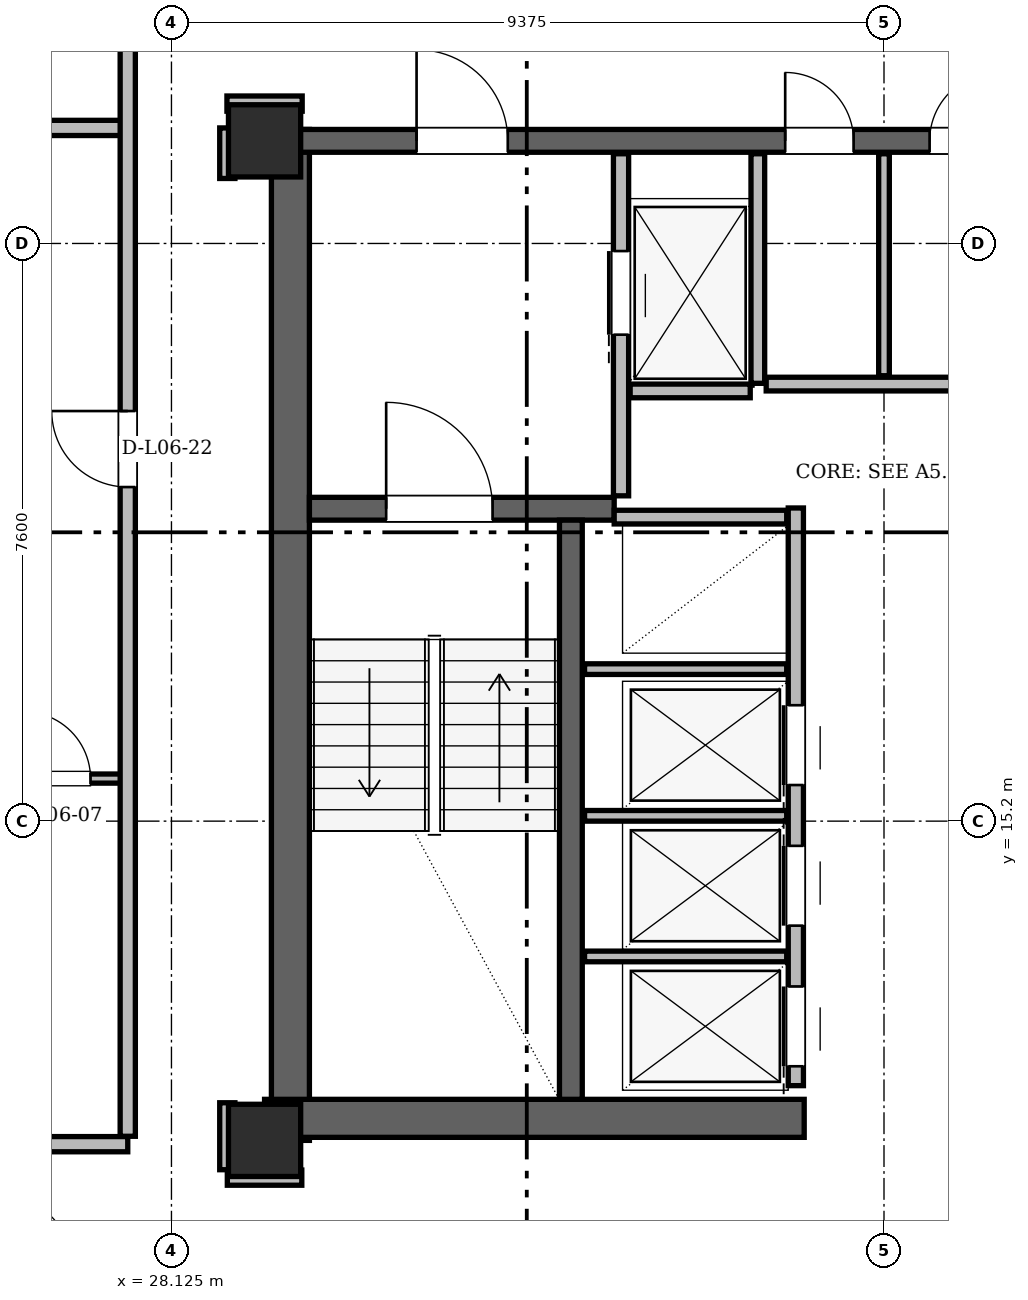
"""IFC4 building model, lengths in metres.
Left out: names, types, materials, properties, quantities, classifications, styles, units other than length and angle.
Written with IfcOpenShell. Run it as: python <this file> out.ifc"""

import sys

from ifc_helpers import new_model, si_unit, direction, frame, frame_2d, origin, origin_2d, place, context, subcontext, project, spatial, rectangle, hollow_rectangle, extrude, element, fill, save


model = new_model("IFC4")
c1 = context("Model", 3, precision=1e-05, world=origin(), true_north=direction((0.0, 1.0)))
c2 = subcontext(c1, "Body", "Model", "MODEL_VIEW")
j1 = project(units=[si_unit("LENGTHUNIT", "METRE"), si_unit("PLANEANGLEUNIT", "RADIAN")], contexts=[c1])
p1 = place(None, origin())
s1 = spatial("IfcSite", under=j1, at=p1, CompositionType="ELEMENT")
p2 = place(p1, origin())
s2 = spatial("IfcBuilding", under=s1, at=p2, CompositionType="ELEMENT")
p3 = place(p2, frame((0.0, 0.0, 27.3)))
s3 = spatial("IfcBuildingStorey", under=s2, at=p3, CompositionType="ELEMENT", Elevation=27.3)
for number, where, z_axis, x_axis in (
    (1, (29.35, 11.0, 0.0), (0.0, 0.0, 1.0), (1.0, 0.0, 0.0)),
    (2, (29.35, 24.15, 0.0), (0.0, 0.0, 1.0), (1.0, 0.0, 0.0)),
):
    element("IfcColumn", number, at=place(p3, frame(where, z_axis=z_axis, x_axis=x_axis)), inside=s3, PredefinedType="COLUMN", context=c2, shape_type="SweptSolid", body=[
        extrude(hollow_rectangle(XDim=0.95, YDim=0.95, WallThickness=0.08, at=origin_2d()), origin(), (0.0, 0.0, 1.0), 3.6),
    ])
p4 = place(p3, frame((29.69, 11.0, 0.0), z_axis=(0.0, 0.0, 1.0), x_axis=(0.0, 1.0, 0.0)))
e3 = element("IfcWall", 3, at=p4, inside=s3, PredefinedType="SHEAR", context=c2, shape_type="SweptSolid", body=[
    extrude(rectangle(XDim=13.3, YDim=0.5, at=frame_2d((6.65, 0.0))), origin(), (0.0, 0.0, 1.0), 3.36),
])
p5 = place(p3, frame((29.35, 11.29, 0.0), z_axis=(0.0, 0.0, 1.0), x_axis=(1.0, 0.0, 0.0)))
e4 = element("IfcWall", 4, at=p5, inside=s3, PredefinedType="SHEAR", context=c2, shape_type="SweptSolid", body=[
    extrude(rectangle(XDim=7.1, YDim=0.5, at=frame_2d((3.55, 0.0))), origin(), (0.0, 0.0, 1.0), 3.36),
])
p6 = place(p3, frame((29.65, 24.15, 0.0), z_axis=(0.0, 0.0, 1.0), x_axis=(1.0, 0.0, 0.0)))
e5 = element("IfcWall", 5, at=p6, inside=s3, PredefinedType="SHEAR", context=c2, shape_type="SweptSolid", body=[
    extrude(rectangle(XDim=15.7, YDim=0.3, at=frame_2d((7.85, 0.0))), origin(), (0.0, 0.0, 1.0), 3.36),
])
p7 = place(p6, frame((1.7, 0.0, 0.0)))
e6 = element("IfcOpeningElement", 6, at=p7, cuts=e5, PredefinedType="OPENING", context=c2, shape_type="SweptSolid", body=[
    extrude(rectangle(XDim=1.2, YDim=2.2, at=frame_2d((0.6, 1.1))), frame((0.0, 0.15, 0.0), z_axis=(0.0, -1.0, 0.0), x_axis=(1.0, 0.0, 0.0)), (0.0, 0.0, 1.0), 0.3),
])
p8 = place(p6, frame((12.8, 0.0, 0.0)))
e7 = element("IfcOpeningElement", 7, at=p8, cuts=e5, PredefinedType="OPENING", context=c2, shape_type="SweptSolid", body=[
    extrude(rectangle(XDim=1.2, YDim=2.2, at=frame_2d((0.6, 1.1))), frame((0.0, 0.15, 0.0), z_axis=(0.0, -1.0, 0.0), x_axis=(1.0, 0.0, 0.0)), (0.0, 0.0, 1.0), 0.3),
])
p9 = place(p6, frame((6.55, 0.0, 0.0)))
e8 = element("IfcOpeningElement", 8, at=p9, cuts=e5, PredefinedType="OPENING", context=c2, shape_type="SweptSolid", body=[
    extrude(rectangle(XDim=0.9, YDim=2.05, at=frame_2d((0.45, 1.025))), frame((0.0, 0.15, 0.0), z_axis=(0.0, -1.0, 0.0), x_axis=(1.0, 0.0, 0.0)), (0.0, 0.0, 1.0), 0.3),
])
p10 = place(p6, frame((8.45, 0.0, 0.0)))
e9 = element("IfcOpeningElement", 9, at=p10, cuts=e5, PredefinedType="OPENING", context=c2, shape_type="SweptSolid", body=[
    extrude(rectangle(XDim=0.9, YDim=2.05, at=frame_2d((0.45, 1.025))), frame((0.0, 0.15, 0.0), z_axis=(0.0, -1.0, 0.0), x_axis=(1.0, 0.0, 0.0)), (0.0, 0.0, 1.0), 0.3),
])
p11 = place(p3, frame((29.94, 19.31, 0.0), z_axis=(0.0, 0.0, 1.0), x_axis=(1.0, 0.0, 0.0)))
e10 = element("IfcWall", 10, at=p11, inside=s3, PredefinedType="SHEAR", context=c2, shape_type="SweptSolid", body=[
    extrude(rectangle(XDim=4.01, YDim=0.3, at=frame_2d((2.005, 0.0))), origin(), (0.0, 0.0, 1.0), 3.36),
])
p12 = place(p11, frame((1.01, 0.0, 0.0)))
e11 = element("IfcOpeningElement", 11, at=p12, cuts=e10, PredefinedType="OPENING", context=c2, shape_type="SweptSolid", body=[
    extrude(rectangle(XDim=1.4, YDim=2.2, at=frame_2d((0.7, 1.1))), frame((0.0, 0.15, 0.0), z_axis=(0.0, -1.0, 0.0), x_axis=(1.0, 0.0, 0.0)), (0.0, 0.0, 1.0), 0.3),
])
p13 = place(p3, frame((33.38, 11.54, 0.0), z_axis=(0.0, 0.0, 1.0), x_axis=(0.0, 1.0, 0.0)))
e12 = element("IfcWall", 12, at=p13, inside=s3, PredefinedType="SHEAR", context=c2, shape_type="SweptSolid", body=[
    extrude(rectangle(XDim=7.62, YDim=0.3, at=frame_2d((3.81, 0.0))), origin(), (0.0, 0.0, 1.0), 3.36),
])
p14 = place(p3, frame((29.452, 43.64, 0.0), z_axis=(0.0, 0.0, 1.0), x_axis=(-0.50000660679, -0.866021589319, 0.0)))
e13 = element("IfcWall", 13, at=p14, inside=s3, PredefinedType="SOLIDWALL", context=c2, shape_type="SweptSolid", body=[
    extrude(rectangle(XDim=32.724, YDim=0.34, at=frame_2d((16.362, 0.0))), origin(), (0.0, 0.0, 1.0), 2.494),
])
p15 = place(p14, frame((2.05, 0.0, 0.0)))
e14 = element("IfcOpeningElement", 14, at=p15, cuts=e13, PredefinedType="OPENING", context=c2, shape_type="SweptSolid", body=[
    extrude(rectangle(XDim=1.6, YDim=2.2, at=frame_2d((0.8, 1.1))), frame((0.0, 0.17, 0.0), z_axis=(0.0, -1.0, 0.0), x_axis=(1.0, 0.0, 0.0)), (0.0, 0.0, 1.0), 0.34),
])
p16 = place(p14, frame((24.19, 0.0, 0.85)))
e15 = element("IfcOpeningElement", 15, at=p16, cuts=e13, PredefinedType="OPENING", context=c2, shape_type="SweptSolid", body=[
    extrude(rectangle(XDim=1.2, YDim=1.48, at=frame_2d((0.6, 0.74))), frame((0.0, 0.17, 0.0), z_axis=(0.0, -1.0, 0.0), x_axis=(1.0, 0.0, 0.0)), (0.0, 0.0, 1.0), 0.34),
])
p17 = place(p14, frame((29.073, 0.0, 0.85)))
e16 = element("IfcOpeningElement", 16, at=p17, cuts=e13, PredefinedType="OPENING", context=c2, shape_type="SweptSolid", body=[
    extrude(rectangle(XDim=2.4, YDim=1.534, at=frame_2d((1.2, 0.767))), frame((0.0, 0.17, 0.0), z_axis=(0.0, -1.0, 0.0), x_axis=(1.0, 0.0, 0.0)), (0.0, 0.0, 1.0), 0.34),
])
p18 = place(p14, frame((10.766, 0.0, 0.85)))
e17 = element("IfcOpeningElement", 17, at=p18, cuts=e13, PredefinedType="OPENING", context=c2, shape_type="SweptSolid", body=[
    extrude(rectangle(XDim=2.5, YDim=1.534, at=frame_2d((1.25, 0.767))), frame((0.0, 0.17, 0.0), z_axis=(0.0, -1.0, 0.0), x_axis=(1.0, 0.0, 0.0)), (0.0, 0.0, 1.0), 0.34),
])
p19 = place(p14, frame((17.741, 0.0, 0.85)))
e18 = element("IfcOpeningElement", 18, at=p19, cuts=e13, PredefinedType="OPENING", context=c2, shape_type="SweptSolid", body=[
    extrude(rectangle(XDim=2.4, YDim=1.534, at=frame_2d((1.2, 0.767))), frame((0.0, 0.17, 0.0), z_axis=(0.0, -1.0, 0.0), x_axis=(1.0, 0.0, 0.0)), (0.0, 0.0, 1.0), 0.34),
])
p20 = place(p14, frame((0.759, 0.0, 0.85)))
e19 = element("IfcOpeningElement", 19, at=p20, cuts=e13, PredefinedType="OPENING", context=c2, shape_type="SweptSolid", body=[
    extrude(rectangle(XDim=1.2, YDim=1.48, at=frame_2d((0.6, 0.74))), frame((0.0, 0.17, 0.0), z_axis=(0.0, -1.0, 0.0), x_axis=(1.0, 0.0, 0.0)), (0.0, 0.0, 1.0), 0.34),
])
p21 = place(p3, frame((34.04, 19.48, 0.0), z_axis=(0.0, 0.0, 1.0), x_axis=(0.0, 1.0, 0.0)))
e20 = element("IfcWall", 20, at=p21, inside=s3, PredefinedType="PARTITIONING", context=c2, shape_type="SweptSolid", body=[
    extrude(rectangle(XDim=4.5, YDim=0.2, at=frame_2d((2.25, 0.0))), origin(), (0.0, 0.0, 1.0), 2.4),
])
p22 = place(p21, frame((2.12, 0.0, 0.0)))
e21 = element("IfcOpeningElement", 21, at=p22, cuts=e20, PredefinedType="OPENING", context=c2, shape_type="SweptSolid", body=[
    extrude(rectangle(XDim=1.1, YDim=2.2, at=frame_2d((0.55, 1.1))), frame((0.0, 0.1, 0.0), z_axis=(0.0, -1.0, 0.0), x_axis=(1.0, 0.0, 0.0)), (0.0, 0.0, 1.0), 0.2),
])
p23 = place(p3, frame((35.84, 20.96, 0.0), z_axis=(0.0, 0.0, 1.0), x_axis=(0.0, 1.0, 0.0)))
e22 = element("IfcWall", 22, at=p23, inside=s3, PredefinedType="PARTITIONING", context=c2, shape_type="SweptSolid", body=[
    extrude(rectangle(XDim=3.02, YDim=0.18, at=frame_2d((1.51, 0.0))), origin(), (0.0, 0.0, 1.0), 2.4),
])
p24 = place(p3, frame((34.16, 20.86, 0.0), z_axis=(0.0, 0.0, 1.0), x_axis=(1.0, 0.0, 0.0)))
e23 = element("IfcWall", 23, at=p24, inside=s3, PredefinedType="PARTITIONING", context=c2, shape_type="SweptSolid", body=[
    extrude(rectangle(XDim=1.58, YDim=0.18, at=frame_2d((0.79, 0.0))), origin(), (0.0, 0.0, 1.0), 3.36),
])
p25 = place(p3, frame((36.34, 11.72, 0.0), z_axis=(0.0, 0.0, 1.0), x_axis=(0.0, 1.0, 0.0)))
e24 = element("IfcWall", 24, at=p25, inside=s3, PredefinedType="PARTITIONING", context=c2, shape_type="SweptSolid", body=[
    extrude(rectangle(XDim=7.6, YDim=0.2, at=frame_2d((3.8, 0.0))), origin(), (0.0, 0.0, 1.0), 3.36),
])
p26 = place(p25, frame((0.255, 0.0, 0.0)))
e25 = element("IfcOpeningElement", 25, at=p26, cuts=e24, PredefinedType="OPENING", context=c2, shape_type="SweptSolid", body=[
    extrude(rectangle(XDim=1.05, YDim=2.15, at=frame_2d((0.525, 1.075))), frame((0.0, 0.1, 0.0), z_axis=(0.0, -1.0, 0.0), x_axis=(1.0, 0.0, 0.0)), (0.0, 0.0, 1.0), 0.2),
])
p27 = place(p25, frame((2.105, 0.0, 0.0)))
e26 = element("IfcOpeningElement", 26, at=p27, cuts=e24, PredefinedType="OPENING", context=c2, shape_type="SweptSolid", body=[
    extrude(rectangle(XDim=1.05, YDim=2.15, at=frame_2d((0.525, 1.075))), frame((0.0, 0.1, 0.0), z_axis=(0.0, -1.0, 0.0), x_axis=(1.0, 0.0, 0.0)), (0.0, 0.0, 1.0), 0.2),
])
p28 = place(p25, frame((3.955, 0.0, 0.0)))
e27 = element("IfcOpeningElement", 27, at=p28, cuts=e24, PredefinedType="OPENING", context=c2, shape_type="SweptSolid", body=[
    extrude(rectangle(XDim=1.05, YDim=2.15, at=frame_2d((0.525, 1.075))), frame((0.0, 0.1, 0.0), z_axis=(0.0, -1.0, 0.0), x_axis=(1.0, 0.0, 0.0)), (0.0, 0.0, 1.0), 0.2),
])
p29 = place(p3, frame((33.95, 19.2, 0.0), z_axis=(0.0, 0.0, 1.0), x_axis=(1.0, 0.0, 0.0)))
e28 = element("IfcWall", 28, at=p29, inside=s3, PredefinedType="PARTITIONING", context=c2, shape_type="SweptSolid", body=[
    extrude(rectangle(XDim=2.27, YDim=0.18, at=frame_2d((1.135, 0.0))), origin(), (0.0, 0.0, 1.0), 3.36),
])
for number, where, z_axis, x_axis in (
    (29, (33.56, 13.42, 0.0), (0.0, 0.0, 1.0), (1.0, 0.0, 0.0)),
    (30, (33.56, 15.27, 0.0), (0.0, 0.0, 1.0), (1.0, 0.0, 0.0)),
    (31, (33.56, 17.2, 0.0), (0.0, 0.0, 1.0), (1.0, 0.0, 0.0)),
):
    element("IfcWall", number, at=place(p3, frame(where, z_axis=z_axis, x_axis=x_axis)), inside=s3, PredefinedType="PARTITIONING", context=c2, shape_type="SweptSolid", body=[
        extrude(rectangle(XDim=2.66, YDim=0.14, at=frame_2d((1.33, 0.0))), origin(), (0.0, 0.0, 1.0), 3.36),
    ])
p30 = place(p3, frame((35.95, 20.95, 0.0), z_axis=(0.0, 0.0, 1.0), x_axis=(1.0, 0.0, 0.0)))
e32 = element("IfcWall", 32, at=p30, inside=s3, PredefinedType="PARTITIONING", context=c2, shape_type="SweptSolid", body=[
    extrude(rectangle(XDim=3.1, YDim=0.18, at=frame_2d((1.55, 0.0))), origin(), (0.0, 0.0, 1.0), 3.36),
])
p31 = place(p3, frame((37.5, 21.06, 0.0), z_axis=(0.0, 0.0, 1.0), x_axis=(0.0, 1.0, 0.0)))
e33 = element("IfcWall", 33, at=p31, inside=s3, PredefinedType="PARTITIONING", context=c2, shape_type="SweptSolid", body=[
    extrude(rectangle(XDim=2.92, YDim=0.14, at=frame_2d((1.46, 0.0))), origin(), (0.0, 0.0, 1.0), 2.4),
])
p32 = place(p3, frame((28.86, 10.51, 0.0), z_axis=(0.0, 0.0, 1.0), x_axis=(1.0, 0.0, 0.0)))
e34 = element("IfcWall", 34, at=p32, inside=s3, PredefinedType="PARTITIONING", context=c2, shape_type="SweptSolid", body=[
    extrude(rectangle(XDim=0.98, YDim=0.2, at=frame_2d((0.49, 0.0))), origin(), (0.0, 0.0, 1.0), 2.738),
])
p33 = place(p3, frame((15.802, 10.95, 0.0), z_axis=(0.0, 0.0, 1.0), x_axis=(1.0, 0.0, 0.0)))
e35 = element("IfcWall", 35, at=p33, inside=s3, PredefinedType="PARTITIONING", context=c2, shape_type="SweptSolid", body=[
    extrude(rectangle(XDim=11.748, YDim=0.2, at=frame_2d((5.874, 0.0))), origin(), (0.0, 0.0, 1.0), 3.36),
])
p34 = place(p3, frame((13.556, 15.76, 0.0), z_axis=(0.0, 0.0, 1.0), x_axis=(1.0, 0.0, 0.0)))
e36 = element("IfcWall", 36, at=p34, inside=s3, PredefinedType="PARTITIONING", context=c2, shape_type="SweptSolid", body=[
    extrude(rectangle(XDim=14.044, YDim=0.12, at=frame_2d((7.022, 0.0))), origin(), (0.0, 0.0, 1.0), 2.946),
])
p35 = place(p34, frame((1.405, 0.0, 0.0)))
e37 = element("IfcOpeningElement", 37, at=p35, cuts=e36, PredefinedType="OPENING", context=c2, shape_type="SweptSolid", body=[
    extrude(rectangle(XDim=0.92, YDim=2.12, at=frame_2d((0.46, 1.06))), frame((0.0, 0.06, 0.0), z_axis=(0.0, -1.0, 0.0), x_axis=(1.0, 0.0, 0.0)), (0.0, 0.0, 1.0), 0.12),
])
p36 = place(p34, frame((5.095, 0.0, 0.0)))
e38 = element("IfcOpeningElement", 38, at=p36, cuts=e36, PredefinedType="OPENING", context=c2, shape_type="SweptSolid", body=[
    extrude(rectangle(XDim=0.92, YDim=2.12, at=frame_2d((0.46, 1.06))), frame((0.0, 0.06, 0.0), z_axis=(0.0, -1.0, 0.0), x_axis=(1.0, 0.0, 0.0)), (0.0, 0.0, 1.0), 0.12),
])
p37 = place(p34, frame((8.214, 0.0, 0.0)))
e39 = element("IfcOpeningElement", 39, at=p37, cuts=e36, PredefinedType="OPENING", context=c2, shape_type="SweptSolid", body=[
    extrude(rectangle(XDim=0.95, YDim=2.1, at=frame_2d((0.475, 1.05))), frame((0.0, 0.06, 0.0), z_axis=(0.0, -1.0, 0.0), x_axis=(1.0, 0.0, 0.0)), (0.0, 0.0, 1.0), 0.12),
])
p38 = place(p34, frame((10.604, 0.0, 0.0)))
e40 = element("IfcOpeningElement", 40, at=p38, cuts=e36, PredefinedType="OPENING", context=c2, shape_type="SweptSolid", body=[
    extrude(rectangle(XDim=0.95, YDim=2.1, at=frame_2d((0.475, 1.05))), frame((0.0, 0.06, 0.0), z_axis=(0.0, -1.0, 0.0), x_axis=(1.0, 0.0, 0.0)), (0.0, 0.0, 1.0), 0.12),
])
p39 = place(p34, frame((12.624, 0.0, 0.0)))
e41 = element("IfcOpeningElement", 41, at=p39, cuts=e36, PredefinedType="OPENING", context=c2, shape_type="SweptSolid", body=[
    extrude(rectangle(XDim=0.88, YDim=2.08, at=frame_2d((0.44, 1.04))), frame((0.0, 0.06, 0.0), z_axis=(0.0, -1.0, 0.0), x_axis=(1.0, 0.0, 0.0)), (0.0, 0.0, 1.0), 0.12),
])
p40 = place(p3, frame((18.498, 24.32, 0.0), z_axis=(0.0, 0.0, 1.0), x_axis=(1.0, 0.0, 0.0)))
e42 = element("IfcWall", 42, at=p40, inside=s3, PredefinedType="PARTITIONING", context=c2, shape_type="SweptSolid", body=[
    extrude(rectangle(XDim=9.052, YDim=0.2, at=frame_2d((4.526, 0.0))), origin(), (0.0, 0.0, 1.0), 2.494),
])
p41 = place(p3, frame((28.855, 24.64, 0.0), z_axis=(0.0, 0.0, 1.0), x_axis=(1.0, 0.0, 0.0)))
e43 = element("IfcWall", 43, at=p41, inside=s3, PredefinedType="PARTITIONING", context=c2, shape_type="SweptSolid", body=[
    extrude(rectangle(XDim=0.99, YDim=0.2, at=frame_2d((0.495, 0.0))), origin(), (0.0, 0.0, 1.0), 2.738),
])
p42 = place(p3, frame((27.55, 11.054, 0.0), z_axis=(0.0, 0.0, 1.0), x_axis=(0.0, 1.0, 0.0)))
e44 = element("IfcWall", 44, at=p42, inside=s3, PredefinedType="PARTITIONING", context=c2, shape_type="SweptSolid", body=[
    extrude(rectangle(XDim=14.812, YDim=0.2, at=frame_2d((7.406, 0.0))), origin(), (0.0, 0.0, 1.0), 2.738),
])
p43 = place(p42, frame((8.541, 0.0, 0.0)))
e45 = element("IfcOpeningElement", 45, at=p43, cuts=e44, PredefinedType="OPENING", context=c2, shape_type="SweptSolid", body=[
    extrude(rectangle(XDim=1.0, YDim=2.18, at=frame_2d((0.5, 1.09))), frame((0.0, 0.1, 0.0), z_axis=(0.0, -1.0, 0.0), x_axis=(1.0, 0.0, 0.0)), (0.0, 0.0, 1.0), 0.2),
])
p44 = place(p3, frame((28.86, 10.614, 0.0), z_axis=(0.0, 0.0, 1.0), x_axis=(0.0, 1.0, 0.0)))
e46 = element("IfcWall", 46, at=p44, inside=s3, PredefinedType="PARTITIONING", context=c2, shape_type="SweptSolid", body=[
    extrude(rectangle(XDim=0.881, YDim=0.2, at=frame_2d((0.44, 0.0))), origin(), (0.0, 0.0, 1.0), 2.738),
])
p45 = place(p3, frame((28.86, 23.655, 0.0), z_axis=(0.0, 0.0, 1.0), x_axis=(0.0, 1.0, 0.0)))
e47 = element("IfcWall", 47, at=p45, inside=s3, PredefinedType="PARTITIONING", context=c2, shape_type="SweptSolid", body=[
    extrude(rectangle(XDim=0.665, YDim=0.2, at=frame_2d((0.333, 0.0))), origin(), (0.0, 0.0, 1.0), 3.36),
])
p46 = place(p22, origin())
e48 = element("IfcDoor", 48, at=p46, inside=s3, OperationType="SLIDING_TO_LEFT", PredefinedType="DOOR", context=c2, shape_type="SweptSolid", body=[
    extrude(rectangle(XDim=1.1, YDim=2.2, at=frame_2d((0.55, 1.1))), frame((0.0, 0.025, 0.0), z_axis=(0.0, -1.0, 0.0), x_axis=(1.0, 0.0, 0.0)), (0.0, 0.0, 1.0), 0.05),
])
fill(e21, e48)
p47 = place(p26, origin())
e49 = element("IfcDoor", 49, at=p47, inside=s3, OperationType="SLIDING_TO_LEFT", PredefinedType="DOOR", context=c2, shape_type="SweptSolid", body=[
    extrude(rectangle(XDim=1.05, YDim=2.15, at=frame_2d((0.525, 1.075))), frame((0.0, 0.025, 0.0), z_axis=(0.0, -1.0, 0.0), x_axis=(1.0, 0.0, 0.0)), (0.0, 0.0, 1.0), 0.05),
])
fill(e25, e49)
p48 = place(p27, origin())
e50 = element("IfcDoor", 50, at=p48, inside=s3, OperationType="SLIDING_TO_RIGHT", PredefinedType="DOOR", context=c2, shape_type="SweptSolid", body=[
    extrude(rectangle(XDim=1.05, YDim=2.15, at=frame_2d((0.525, 1.075))), frame((0.0, 0.025, 0.0), z_axis=(0.0, -1.0, 0.0), x_axis=(1.0, 0.0, 0.0)), (0.0, 0.0, 1.0), 0.05),
])
fill(e26, e50)
p49 = place(p28, origin())
e51 = element("IfcDoor", 51, at=p49, inside=s3, OperationType="SLIDING_TO_LEFT", PredefinedType="DOOR", context=c2, shape_type="SweptSolid", body=[
    extrude(rectangle(XDim=1.05, YDim=2.15, at=frame_2d((0.525, 1.075))), frame((0.0, 0.025, 0.0), z_axis=(0.0, -1.0, 0.0), x_axis=(1.0, 0.0, 0.0)), (0.0, 0.0, 1.0), 0.05),
])
fill(e27, e51)
p50 = place(p12, origin())
e52 = element("IfcDoor", 52, at=p50, inside=s3, OperationType="SINGLE_SWING_LEFT", PredefinedType="DOOR", context=c2, shape_type="SweptSolid", body=[
    extrude(rectangle(XDim=1.4, YDim=2.2, at=frame_2d((0.7, 1.1))), frame((0.0, 0.025, 0.0), z_axis=(0.0, -1.0, 0.0), x_axis=(1.0, 0.0, 0.0)), (0.0, 0.0, 1.0), 0.05),
])
fill(e11, e52)
p51 = place(p7, origin())
e53 = element("IfcDoor", 53, at=p51, inside=s3, OperationType="SINGLE_SWING_LEFT", PredefinedType="DOOR", context=c2, shape_type="SweptSolid", body=[
    extrude(rectangle(XDim=1.2, YDim=2.2, at=frame_2d((0.6, 1.1))), frame((0.0, 0.025, 0.0), z_axis=(0.0, -1.0, 0.0), x_axis=(1.0, 0.0, 0.0)), (0.0, 0.0, 1.0), 0.05),
])
fill(e6, e53)
p52 = place(p9, origin())
e54 = element("IfcDoor", 54, at=p52, inside=s3, OperationType="SINGLE_SWING_LEFT", PredefinedType="DOOR", context=c2, shape_type="SweptSolid", body=[
    extrude(rectangle(XDim=0.9, YDim=2.05, at=frame_2d((0.45, 1.025))), frame((0.0, 0.025, 0.0), z_axis=(0.0, -1.0, 0.0), x_axis=(1.0, 0.0, 0.0)), (0.0, 0.0, 1.0), 0.05),
])
fill(e8, e54)
p53 = place(p10, origin())
e55 = element("IfcDoor", 55, at=p53, inside=s3, OperationType="SINGLE_SWING_RIGHT", PredefinedType="DOOR", context=c2, shape_type="SweptSolid", body=[
    extrude(rectangle(XDim=0.9, YDim=2.05, at=frame_2d((0.45, 1.025))), frame((0.0, 0.025, 0.0), z_axis=(0.0, -1.0, 0.0), x_axis=(1.0, 0.0, 0.0)), (0.0, 0.0, 1.0), 0.05),
])
fill(e9, e55)
p54 = place(p39, origin())
e56 = element("IfcDoor", 56, at=p54, inside=s3, OperationType="SINGLE_SWING_LEFT", PredefinedType="DOOR", context=c2, shape_type="SweptSolid", body=[
    extrude(rectangle(XDim=0.88, YDim=2.08, at=frame_2d((0.44, 1.04))), frame((0.0, 0.025, 0.0), z_axis=(0.0, -1.0, 0.0), x_axis=(1.0, 0.0, 0.0)), (0.0, 0.0, 1.0), 0.05),
])
fill(e41, e56)
p55 = place(p43, origin())
e57 = element("IfcDoor", 57, at=p55, inside=s3, OperationType="SINGLE_SWING_RIGHT", PredefinedType="DOOR", context=c2, shape_type="SweptSolid", body=[
    extrude(rectangle(XDim=1.0, YDim=2.18, at=frame_2d((0.5, 1.09))), frame((0.0, 0.025, 0.0), z_axis=(0.0, -1.0, 0.0), x_axis=(1.0, 0.0, 0.0)), (0.0, 0.0, 1.0), 0.05),
])
fill(e45, e57)
save(model, sys.argv[1])
